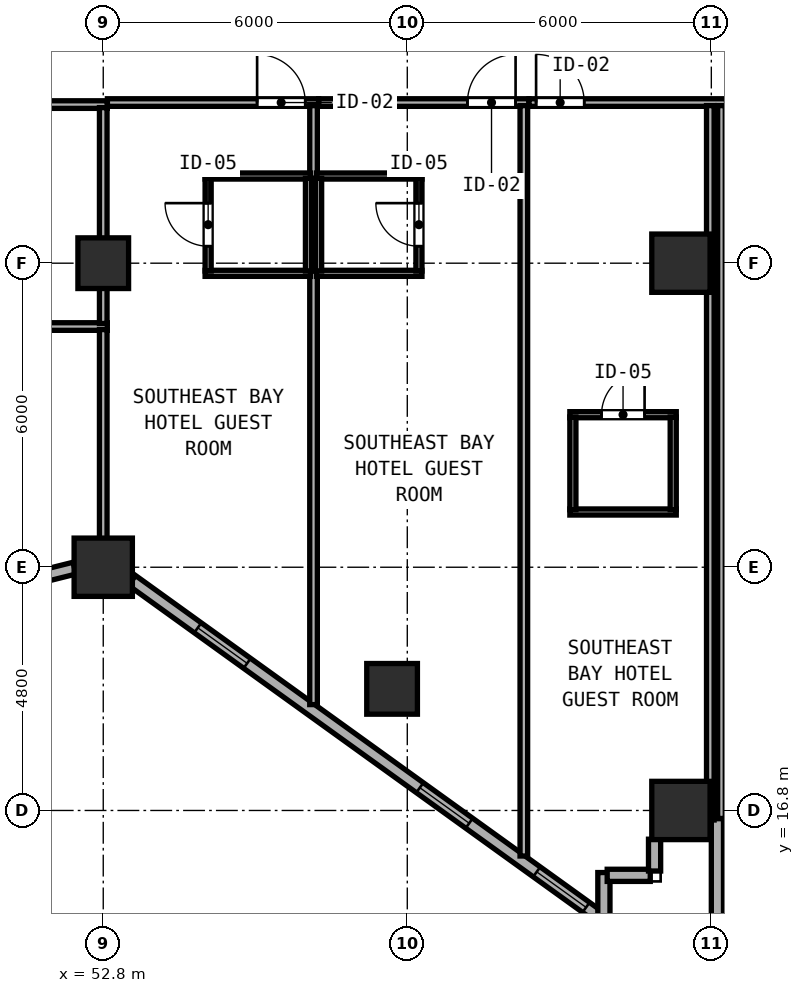
"""IFC4 building model, lengths in metres.
Left out: names, types, materials, properties, quantities, classifications, styles, units other than length and angle.
Written with IfcOpenShell. Run it as: python <this file> out.ifc"""

import sys

from ifc_helpers import new_model, si_unit, direction, frame, frame_2d, origin, origin_2d, place, context, subcontext, project, spatial, rectangle, hollow_rectangle, extrude, element, fill, save


model = new_model("IFC4")
c1 = context("Model", 3, precision=1e-05, world=origin(), true_north=direction((0.0, 1.0)))
c2 = subcontext(c1, "Body", "Model", "MODEL_VIEW")
j1 = project(units=[si_unit("LENGTHUNIT", "METRE"), si_unit("PLANEANGLEUNIT", "RADIAN")], contexts=[c1])
p1 = place(None, origin())
s1 = spatial("IfcSite", under=j1, at=p1, CompositionType="ELEMENT")
p2 = place(p1, origin())
s2 = spatial("IfcBuilding", under=s1, at=p2, CompositionType="ELEMENT")
p3 = place(p2, frame((0.0, 0.0, 78.0)))
s3 = spatial("IfcBuildingStorey", under=s2, at=p3, CompositionType="ELEMENT", Elevation=78.0)
for number, where, z_axis, x_axis in (
    (1, (52.8, 21.6, 0.0), (0.0, 0.0, 1.0), (1.0, 0.0, 0.0)),
    (2, (64.2, 16.8, 0.0), (0.0, 0.0, 1.0), (1.0, 0.0, 0.0)),
    (3, (64.2, 27.6, 0.0), (0.0, 0.0, 1.0), (1.0, 0.0, 0.0)),
):
    element("IfcColumn", number, at=place(p3, frame(where, z_axis=z_axis, x_axis=x_axis)), inside=s3, PredefinedType="COLUMN", context=c2, shape_type="SweptSolid", body=[
        extrude(hollow_rectangle(XDim=1.15, YDim=1.15, WallThickness=0.042, at=origin_2d()), origin(), (0.0, 0.0, 1.0), 3.8),
    ])
for number, where, z_axis, x_axis in (
    (4, (52.8, 27.6, 0.0), (0.0, 0.0, 1.0), (1.0, 0.0, 0.0)),
    (5, (58.5, 19.2, 0.0), (0.0, 0.0, 1.0), (1.0, 0.0, 0.0)),
):
    element("IfcColumn", number, at=place(p3, frame(where, z_axis=z_axis, x_axis=x_axis)), inside=s3, PredefinedType="COLUMN", context=c2, shape_type="SweptSolid", body=[
        extrude(hollow_rectangle(XDim=1.0, YDim=1.0, WallThickness=0.038, at=origin_2d()), origin(), (0.0, 0.0, 1.0), 3.8),
    ])
p4 = place(p3, frame((47.932, 20.507, 0.0), z_axis=(0.0, 0.0, 1.0), x_axis=(0.970145739396, 0.242522667667, 0.0)))
e6 = element("IfcWall", 6, at=p4, inside=s3, PredefinedType="SOLIDWALL", context=c2, shape_type="SweptSolid", body=[
    extrude(rectangle(XDim=4.433, YDim=0.24, at=frame_2d((2.217, 0.0))), origin(), (0.0, 0.0, 1.0), 3.097),
])
p5 = place(p4, frame((1.6, 0.0, 0.85)))
e7 = element("IfcOpeningElement", 7, at=p5, cuts=e6, PredefinedType="OPENING", context=c2, shape_type="SweptSolid", body=[
    extrude(rectangle(XDim=1.2, YDim=1.85, at=frame_2d((0.6, 0.925))), frame((0.0, 0.13, 0.0), z_axis=(0.0, -1.0, 0.0), x_axis=(1.0, 0.0, 0.0)), (0.0, 0.0, 1.0), 0.26),
])
p6 = place(p3, frame((53.367, 21.34, 0.0), z_axis=(0.0, 0.0, 1.0), x_axis=(0.811543176492, -0.58429245476, 0.0)))
e8 = element("IfcWall", 8, at=p6, inside=s3, PredefinedType="SOLIDWALL", context=c2, shape_type="SweptSolid", body=[
    extrude(rectangle(XDim=11.531, YDim=0.24, at=frame_2d((5.765, 0.0))), origin(), (0.0, 0.0, 1.0), 3.097),
])
p7 = place(p6, frame((1.6, 0.0, 0.85)))
e9 = element("IfcOpeningElement", 9, at=p7, cuts=e8, PredefinedType="OPENING", context=c2, shape_type="SweptSolid", body=[
    extrude(rectangle(XDim=1.2, YDim=1.85, at=frame_2d((0.6, 0.925))), frame((0.0, 0.13, 0.0), z_axis=(0.0, -1.0, 0.0), x_axis=(1.0, 0.0, 0.0)), (0.0, 0.0, 1.0), 0.26),
])
p8 = place(p6, frame((7.0, 0.0, 0.85)))
e10 = element("IfcOpeningElement", 10, at=p8, cuts=e8, PredefinedType="OPENING", context=c2, shape_type="SweptSolid", body=[
    extrude(rectangle(XDim=1.2, YDim=1.85, at=frame_2d((0.6, 0.925))), frame((0.0, 0.13, 0.0), z_axis=(0.0, -1.0, 0.0), x_axis=(1.0, 0.0, 0.0)), (0.0, 0.0, 1.0), 0.26),
])
p9 = place(p6, frame((9.842, 0.0, 0.85)))
e11 = element("IfcOpeningElement", 11, at=p9, cuts=e8, PredefinedType="OPENING", context=c2, shape_type="SweptSolid", body=[
    extrude(rectangle(XDim=1.2, YDim=1.85, at=frame_2d((0.6, 0.925))), frame((0.0, 0.13, 0.0), z_axis=(0.0, -1.0, 0.0), x_axis=(1.0, 0.0, 0.0)), (0.0, 0.0, 1.0), 0.26),
])
p10 = place(p3, frame((62.68, 14.579, 0.0), z_axis=(0.0, 0.0, 1.0), x_axis=(0.0, 1.0, 0.0)))
e12 = element("IfcWall", 12, at=p10, inside=s3, PredefinedType="SOLIDWALL", context=c2, shape_type="SweptSolid", body=[
    extrude(rectangle(XDim=0.996, YDim=0.24, at=frame_2d((0.498, 0.0))), origin(), (0.0, 0.0, 1.0), 3.6),
])
p11 = place(p3, frame((62.745, 15.52, 0.0), z_axis=(0.0, 0.0, 1.0), x_axis=(1.0, 0.0, 0.0)))
e13 = element("IfcWall", 13, at=p11, inside=s3, PredefinedType="SOLIDWALL", context=c2, shape_type="SweptSolid", body=[
    extrude(rectangle(XDim=0.85, YDim=0.24, at=frame_2d((0.425, 0.0))), origin(), (0.0, 0.0, 1.0), 3.6),
])
p12 = place(p3, frame((63.68, 15.605, 0.0), z_axis=(0.0, 0.0, 1.0), x_axis=(0.0, 1.0, 0.0)))
e14 = element("IfcWall", 14, at=p12, inside=s3, PredefinedType="SOLIDWALL", context=c2, shape_type="SweptSolid", body=[
    extrude(rectangle(XDim=0.628, YDim=0.24, at=frame_2d((0.314, 0.0))), origin(), (0.0, 0.0, 1.0), 3.6),
])
p13 = place(p3, frame((64.92, 16.64, 0.0), z_axis=(0.0, 0.0, 1.0), x_axis=(0.0, -1.0, 0.0)))
e15 = element("IfcWall", 15, at=p13, inside=s3, PredefinedType="SOLIDWALL", context=c2, shape_type="SweptSolid", body=[
    extrude(rectangle(XDim=2.243, YDim=0.24, at=frame_2d((1.121, 0.0))), origin(), (0.0, 0.0, 1.0), 3.6),
])
p14 = place(p3, frame((73.388, 31.079, 0.0), z_axis=(0.0, 0.0, 1.0), x_axis=(-0.963197271032, 0.268795493036, 0.0)))
e16 = element("IfcWall", 16, at=p14, inside=s3, PredefinedType="SOLIDWALL", context=c2, shape_type="SweptSolid", body=[
    extrude(rectangle(XDim=9.095, YDim=0.24, at=frame_2d((4.548, 0.0))), origin(), (0.0, 0.0, 1.0), 3.6),
])
p15 = place(p14, frame((1.6, 0.0, 0.85)))
e17 = element("IfcOpeningElement", 17, at=p15, cuts=e16, PredefinedType="OPENING", context=c2, shape_type="SweptSolid", body=[
    extrude(rectangle(XDim=1.2, YDim=1.85, at=frame_2d((0.6, 0.925))), frame((0.0, 0.13, 0.0), z_axis=(0.0, -1.0, 0.0), x_axis=(1.0, 0.0, 0.0)), (0.0, 0.0, 1.0), 0.26),
])
p16 = place(p14, frame((7.0, 0.0, 0.85)))
e18 = element("IfcOpeningElement", 18, at=p16, cuts=e16, PredefinedType="OPENING", context=c2, shape_type="SweptSolid", body=[
    extrude(rectangle(XDim=1.2, YDim=1.85, at=frame_2d((0.6, 0.925))), frame((0.0, 0.13, 0.0), z_axis=(0.0, -1.0, 0.0), x_axis=(1.0, 0.0, 0.0)), (0.0, 0.0, 1.0), 0.26),
])
for number, where, z_axis, x_axis in (
    (19, (49.08, 30.73, 0.0), (0.0, 0.0, 1.0), (1.0, 0.0, 0.0)),
    (20, (49.08, 26.35, 0.0), (0.0, 0.0, 1.0), (1.0, 0.0, 0.0)),
):
    element("IfcWall", number, at=place(p3, frame(where, z_axis=z_axis, x_axis=x_axis)), inside=s3, PredefinedType="PARTITIONING", context=c2, shape_type="SweptSolid", body=[
        extrude(rectangle(XDim=3.8, YDim=0.15, at=frame_2d((1.9, 0.0))), origin(), (0.0, 0.0, 1.0), 3.6),
    ])
p17 = place(p3, frame((52.8, 26.41, 0.0), z_axis=(0.0, 0.0, 1.0), x_axis=(0.0, 1.0, 0.0)))
e21 = element("IfcWall", 21, at=p17, inside=s3, PredefinedType="PARTITIONING", context=c2, shape_type="SweptSolid", body=[
    extrude(rectangle(XDim=4.26, YDim=0.15, at=frame_2d((2.13, 0.0))), origin(), (0.0, 0.0, 1.0), 3.097),
])
p18 = place(p3, frame((52.882, 30.77, 0.0), z_axis=(0.0, 0.0, 1.0), x_axis=(1.0, 0.0, 0.0)))
e22 = element("IfcWall", 22, at=p18, inside=s3, PredefinedType="PARTITIONING", context=c2, shape_type="SweptSolid", body=[
    extrude(rectangle(XDim=4.168, YDim=0.15, at=frame_2d((2.084, 0.0))), origin(), (0.0, 0.0, 1.0), 3.6),
])
p19 = place(p18, frame((3.905, 0.0, 0.0), z_axis=(0.0, 0.0, 1.0), x_axis=(-1.0, 0.0, 0.0)))
e23 = element("IfcOpeningElement", 23, at=p19, cuts=e22, PredefinedType="OPENING", context=c2, shape_type="SweptSolid", body=[
    extrude(rectangle(XDim=0.95, YDim=2.15, at=frame_2d((0.475, 1.075))), frame((0.0, 0.085, 0.0), z_axis=(0.0, -1.0, 0.0), x_axis=(1.0, 0.0, 0.0)), (0.0, 0.0, 1.0), 0.17),
])
p20 = place(p3, frame((52.8, 21.819, 0.0), z_axis=(0.0, 0.0, 1.0), x_axis=(0.0, 1.0, 0.0)))
e24 = element("IfcWall", 24, at=p20, inside=s3, PredefinedType="PARTITIONING", context=c2, shape_type="SweptSolid", body=[
    extrude(rectangle(XDim=4.471, YDim=0.15, at=frame_2d((2.236, 0.0))), origin(), (0.0, 0.0, 1.0), 3.097),
])
p21 = place(p3, frame((56.95, 18.889, 0.0), z_axis=(0.0, 0.0, 1.0), x_axis=(0.0, 1.0, 0.0)))
e25 = element("IfcWall", 25, at=p21, inside=s3, PredefinedType="PARTITIONING", context=c2, shape_type="SweptSolid", body=[
    extrude(rectangle(XDim=11.821, YDim=0.15, at=frame_2d((5.91, 0.0))), origin(), (0.0, 0.0, 1.0), 3.6),
])
p22 = place(p3, frame((54.81, 29.32, 0.0), z_axis=(0.0, 0.0, 1.0), x_axis=(1.0, 0.0, 0.0)))
e26 = element("IfcWall", 26, at=p22, inside=s3, PredefinedType="PARTITIONING", context=c2, shape_type="SweptSolid", body=[
    extrude(rectangle(XDim=2.08, YDim=0.12, at=frame_2d((1.04, 0.0))), origin(), (0.0, 0.0, 1.0), 3.6),
])
p23 = place(p3, frame((54.81, 27.4, 0.0), z_axis=(0.0, 0.0, 1.0), x_axis=(1.0, 0.0, 0.0)))
e27 = element("IfcWall", 27, at=p23, inside=s3, PredefinedType="PARTITIONING", context=c2, shape_type="SweptSolid", body=[
    extrude(rectangle(XDim=2.08, YDim=0.12, at=frame_2d((1.04, 0.0))), origin(), (0.0, 0.0, 1.0), 3.097),
])
p24 = place(p3, frame((54.87, 27.445, 0.0), z_axis=(0.0, 0.0, 1.0), x_axis=(0.0, 1.0, 0.0)))
e28 = element("IfcWall", 28, at=p24, inside=s3, PredefinedType="PARTITIONING", context=c2, shape_type="SweptSolid", body=[
    extrude(rectangle(XDim=1.83, YDim=0.12, at=frame_2d((0.915, 0.0))), origin(), (0.0, 0.0, 1.0), 3.6),
])
p25 = place(p24, frame((1.34, 0.0, 0.0), z_axis=(0.0, 0.0, 1.0), x_axis=(-1.0, 0.0, 0.0)))
e29 = element("IfcOpeningElement", 29, at=p25, cuts=e28, PredefinedType="OPENING", context=c2, shape_type="SweptSolid", body=[
    extrude(rectangle(XDim=0.85, YDim=2.1, at=frame_2d((0.425, 1.05))), frame((0.0, 0.07, 0.0), z_axis=(0.0, -1.0, 0.0), x_axis=(1.0, 0.0, 0.0)), (0.0, 0.0, 1.0), 0.14),
])
p26 = place(p3, frame((56.85, 27.445, 0.0), z_axis=(0.0, 0.0, 1.0), x_axis=(0.0, 1.0, 0.0)))
e30 = element("IfcWall", 30, at=p26, inside=s3, PredefinedType="PARTITIONING", context=c2, shape_type="SweptSolid", body=[
    extrude(rectangle(XDim=1.83, YDim=0.12, at=frame_2d((0.915, 0.0))), origin(), (0.0, 0.0, 1.0), 3.6),
])
p27 = place(p3, frame((57.052, 30.77, 0.0), z_axis=(0.0, 0.0, 1.0), x_axis=(1.0, 0.0, 0.0)))
e31 = element("IfcWall", 31, at=p27, inside=s3, PredefinedType="PARTITIONING", context=c2, shape_type="SweptSolid", body=[
    extrude(rectangle(XDim=4.148, YDim=0.15, at=frame_2d((2.074, 0.0))), origin(), (0.0, 0.0, 1.0), 3.6),
])
p28 = place(p27, frame((3.885, 0.0, 0.0), z_axis=(0.0, 0.0, 1.0), x_axis=(-1.0, 0.0, 0.0)))
e32 = element("IfcOpeningElement", 32, at=p28, cuts=e31, PredefinedType="OPENING", context=c2, shape_type="SweptSolid", body=[
    extrude(rectangle(XDim=0.95, YDim=2.15, at=frame_2d((0.475, 1.075))), frame((0.0, 0.085, 0.0), z_axis=(0.0, -1.0, 0.0), x_axis=(1.0, 0.0, 0.0)), (0.0, 0.0, 1.0), 0.17),
])
p29 = place(p3, frame((61.1, 15.901, 0.0), z_axis=(0.0, 0.0, 1.0), x_axis=(0.0, 1.0, 0.0)))
e33 = element("IfcWall", 33, at=p29, inside=s3, PredefinedType="PARTITIONING", context=c2, shape_type="SweptSolid", body=[
    extrude(rectangle(XDim=14.809, YDim=0.15, at=frame_2d((7.404, 0.0))), origin(), (0.0, 0.0, 1.0), 3.6),
])
p30 = place(p3, frame((57.01, 29.32, 0.0), z_axis=(0.0, 0.0, 1.0), x_axis=(1.0, 0.0, 0.0)))
e34 = element("IfcWall", 34, at=p30, inside=s3, PredefinedType="PARTITIONING", context=c2, shape_type="SweptSolid", body=[
    extrude(rectangle(XDim=2.08, YDim=0.12, at=frame_2d((1.04, 0.0))), origin(), (0.0, 0.0, 1.0), 3.6),
])
p31 = place(p3, frame((57.01, 27.4, 0.0), z_axis=(0.0, 0.0, 1.0), x_axis=(1.0, 0.0, 0.0)))
e35 = element("IfcWall", 35, at=p31, inside=s3, PredefinedType="PARTITIONING", context=c2, shape_type="SweptSolid", body=[
    extrude(rectangle(XDim=2.08, YDim=0.12, at=frame_2d((1.04, 0.0))), origin(), (0.0, 0.0, 1.0), 3.097),
])
p32 = place(p3, frame((57.05, 27.445, 0.0), z_axis=(0.0, 0.0, 1.0), x_axis=(0.0, 1.0, 0.0)))
e36 = element("IfcWall", 36, at=p32, inside=s3, PredefinedType="PARTITIONING", context=c2, shape_type="SweptSolid", body=[
    extrude(rectangle(XDim=1.83, YDim=0.12, at=frame_2d((0.915, 0.0))), origin(), (0.0, 0.0, 1.0), 3.6),
])
p33 = place(p3, frame((59.03, 27.445, 0.0), z_axis=(0.0, 0.0, 1.0), x_axis=(0.0, 1.0, 0.0)))
e37 = element("IfcWall", 37, at=p33, inside=s3, PredefinedType="PARTITIONING", context=c2, shape_type="SweptSolid", body=[
    extrude(rectangle(XDim=1.83, YDim=0.12, at=frame_2d((0.915, 0.0))), origin(), (0.0, 0.0, 1.0), 3.6),
])
p34 = place(p33, frame((0.49, 0.0, 0.0)))
e38 = element("IfcOpeningElement", 38, at=p34, cuts=e37, PredefinedType="OPENING", context=c2, shape_type="SweptSolid", body=[
    extrude(rectangle(XDim=0.85, YDim=2.1, at=frame_2d((0.425, 1.05))), frame((0.0, 0.07, 0.0), z_axis=(0.0, -1.0, 0.0), x_axis=(1.0, 0.0, 0.0)), (0.0, 0.0, 1.0), 0.14),
])
p35 = place(p3, frame((61.202, 30.77, 0.0), z_axis=(0.0, 0.0, 1.0), x_axis=(1.0, 0.0, 0.0)))
e39 = element("IfcWall", 39, at=p35, inside=s3, PredefinedType="PARTITIONING", context=c2, shape_type="SweptSolid", body=[
    extrude(rectangle(XDim=3.898, YDim=0.15, at=frame_2d((1.949, 0.0))), origin(), (0.0, 0.0, 1.0), 3.6),
])
p36 = place(p35, frame((1.09, 0.0, 0.0), z_axis=(0.0, 0.0, 1.0), x_axis=(-1.0, 0.0, 0.0)))
e40 = element("IfcOpeningElement", 40, at=p36, cuts=e39, PredefinedType="OPENING", context=c2, shape_type="SweptSolid", body=[
    extrude(rectangle(XDim=0.95, YDim=2.15, at=frame_2d((0.475, 1.075))), frame((0.0, 0.085, 0.0), z_axis=(0.0, -1.0, 0.0), x_axis=(1.0, 0.0, 0.0)), (0.0, 0.0, 1.0), 0.17),
])
p37 = place(p3, frame((65.0, 16.642, 0.0), z_axis=(0.0, 0.0, 1.0), x_axis=(0.0, 1.0, 0.0)))
e41 = element("IfcWall", 41, at=p37, inside=s3, PredefinedType="PARTITIONING", context=c2, shape_type="SweptSolid", body=[
    extrude(rectangle(XDim=14.068, YDim=0.15, at=frame_2d((7.034, 0.0))), origin(), (0.0, 0.0, 1.0), 3.6),
])
p38 = place(p3, frame((62.008, 24.61, 0.0), z_axis=(0.0, 0.0, 1.0), x_axis=(1.0, 0.0, 0.0)))
e42 = element("IfcWall", 42, at=p38, inside=s3, PredefinedType="PARTITIONING", context=c2, shape_type="SweptSolid", body=[
    extrude(rectangle(XDim=2.1, YDim=0.12, at=frame_2d((1.05, 0.0))), origin(), (0.0, 0.0, 1.0), 3.6),
])
p39 = place(p38, frame((1.475, 0.0, 0.0), z_axis=(0.0, 0.0, 1.0), x_axis=(-1.0, 0.0, 0.0)))
e43 = element("IfcOpeningElement", 43, at=p39, cuts=e42, PredefinedType="OPENING", context=c2, shape_type="SweptSolid", body=[
    extrude(rectangle(XDim=0.85, YDim=2.1, at=frame_2d((0.425, 1.05))), frame((0.0, 0.07, 0.0), z_axis=(0.0, -1.0, 0.0), x_axis=(1.0, 0.0, 0.0)), (0.0, 0.0, 1.0), 0.14),
])
p40 = place(p3, frame((62.008, 22.69, 0.0), z_axis=(0.0, 0.0, 1.0), x_axis=(1.0, 0.0, 0.0)))
e44 = element("IfcWall", 44, at=p40, inside=s3, PredefinedType="PARTITIONING", context=c2, shape_type="SweptSolid", body=[
    extrude(rectangle(XDim=2.1, YDim=0.12, at=frame_2d((1.05, 0.0))), origin(), (0.0, 0.0, 1.0), 3.6),
])
p41 = place(p3, frame((62.068, 22.735, 0.0), z_axis=(0.0, 0.0, 1.0), x_axis=(0.0, 1.0, 0.0)))
e45 = element("IfcWall", 45, at=p41, inside=s3, PredefinedType="PARTITIONING", context=c2, shape_type="SweptSolid", body=[
    extrude(rectangle(XDim=1.83, YDim=0.12, at=frame_2d((0.915, 0.0))), origin(), (0.0, 0.0, 1.0), 3.6),
])
p42 = place(p3, frame((64.048, 22.735, 0.0), z_axis=(0.0, 0.0, 1.0), x_axis=(0.0, 1.0, 0.0)))
e46 = element("IfcWall", 46, at=p42, inside=s3, PredefinedType="PARTITIONING", context=c2, shape_type="SweptSolid", body=[
    extrude(rectangle(XDim=1.83, YDim=0.12, at=frame_2d((0.915, 0.0))), origin(), (0.0, 0.0, 1.0), 3.097),
])
p43 = place(p3, frame((64.78, 16.612, 0.0), z_axis=(0.0, 0.0, 1.0), x_axis=(0.0, 1.0, 0.0)))
e47 = element("IfcWall", 47, at=p43, inside=s3, PredefinedType="PARTITIONING", context=c2, shape_type="SweptSolid", body=[
    extrude(rectangle(XDim=14.098, YDim=0.15, at=frame_2d((7.049, 0.0))), origin(), (0.0, 0.0, 1.0), 3.6),
])
p44 = place(p7, origin())
e48 = element("IfcWindow", 48, at=p44, inside=s3, PartitioningType="SINGLE_PANEL", PredefinedType="WINDOW", context=c2, shape_type="SweptSolid", body=[
    extrude(rectangle(XDim=1.2, YDim=1.85, at=frame_2d((0.6, 0.925))), frame((0.0, 0.03, 0.0), z_axis=(0.0, -1.0, 0.0), x_axis=(1.0, 0.0, 0.0)), (0.0, 0.0, 1.0), 0.06),
])
fill(e9, e48)
p45 = place(p8, origin())
e49 = element("IfcWindow", 49, at=p45, inside=s3, PartitioningType="SINGLE_PANEL", PredefinedType="WINDOW", context=c2, shape_type="SweptSolid", body=[
    extrude(rectangle(XDim=1.2, YDim=1.85, at=frame_2d((0.6, 0.925))), frame((0.0, 0.03, 0.0), z_axis=(0.0, -1.0, 0.0), x_axis=(1.0, 0.0, 0.0)), (0.0, 0.0, 1.0), 0.06),
])
fill(e10, e49)
p46 = place(p19, origin())
e50 = element("IfcDoor", 50, at=p46, inside=s3, OperationType="SINGLE_SWING_RIGHT", PredefinedType="DOOR", context=c2, shape_type="SweptSolid", body=[
    extrude(rectangle(XDim=0.95, YDim=2.15, at=frame_2d((0.475, 1.075))), frame((0.0, 0.025, 0.0), z_axis=(0.0, -1.0, 0.0), x_axis=(1.0, 0.0, 0.0)), (0.0, 0.0, 1.0), 0.05),
])
fill(e23, e50)
p47 = place(p25, origin())
e51 = element("IfcDoor", 51, at=p47, inside=s3, OperationType="SINGLE_SWING_LEFT", PredefinedType="DOOR", context=c2, shape_type="SweptSolid", body=[
    extrude(rectangle(XDim=0.85, YDim=2.1, at=frame_2d((0.425, 1.05))), frame((0.0, 0.025, 0.0), z_axis=(0.0, -1.0, 0.0), x_axis=(1.0, 0.0, 0.0)), (0.0, 0.0, 1.0), 0.05),
])
fill(e29, e51)
p48 = place(p28, origin())
e52 = element("IfcDoor", 52, at=p48, inside=s3, OperationType="SINGLE_SWING_LEFT", PredefinedType="DOOR", context=c2, shape_type="SweptSolid", body=[
    extrude(rectangle(XDim=0.95, YDim=2.15, at=frame_2d((0.475, 1.075))), frame((0.0, 0.025, 0.0), z_axis=(0.0, -1.0, 0.0), x_axis=(1.0, 0.0, 0.0)), (0.0, 0.0, 1.0), 0.05),
])
fill(e32, e52)
p49 = place(p34, origin())
e53 = element("IfcDoor", 53, at=p49, inside=s3, OperationType="SINGLE_SWING_RIGHT", PredefinedType="DOOR", context=c2, shape_type="SweptSolid", body=[
    extrude(rectangle(XDim=0.85, YDim=2.1, at=frame_2d((0.425, 1.05))), frame((0.0, 0.025, 0.0), z_axis=(0.0, -1.0, 0.0), x_axis=(1.0, 0.0, 0.0)), (0.0, 0.0, 1.0), 0.05),
])
fill(e38, e53)
p50 = place(p36, origin())
e54 = element("IfcDoor", 54, at=p50, inside=s3, OperationType="SINGLE_SWING_RIGHT", PredefinedType="DOOR", context=c2, shape_type="SweptSolid", body=[
    extrude(rectangle(XDim=0.95, YDim=2.15, at=frame_2d((0.475, 1.075))), frame((0.0, 0.025, 0.0), z_axis=(0.0, -1.0, 0.0), x_axis=(1.0, 0.0, 0.0)), (0.0, 0.0, 1.0), 0.05),
])
fill(e40, e54)
p51 = place(p39, origin())
e55 = element("IfcDoor", 55, at=p51, inside=s3, OperationType="SINGLE_SWING_LEFT", PredefinedType="DOOR", context=c2, shape_type="SweptSolid", body=[
    extrude(rectangle(XDim=0.85, YDim=2.1, at=frame_2d((0.425, 1.05))), frame((0.0, 0.025, 0.0), z_axis=(0.0, -1.0, 0.0), x_axis=(1.0, 0.0, 0.0)), (0.0, 0.0, 1.0), 0.05),
])
fill(e43, e55)
p52 = place(p9, origin())
e56 = element("IfcWindow", 56, at=p52, inside=s3, PartitioningType="SINGLE_PANEL", PredefinedType="WINDOW", context=c2, shape_type="SweptSolid", body=[
    extrude(rectangle(XDim=1.2, YDim=1.85, at=frame_2d((0.6, 0.925))), frame((0.0, 0.03, 0.0), z_axis=(0.0, -1.0, 0.0), x_axis=(1.0, 0.0, 0.0)), (0.0, 0.0, 1.0), 0.06),
])
fill(e11, e56)
save(model, sys.argv[1])
